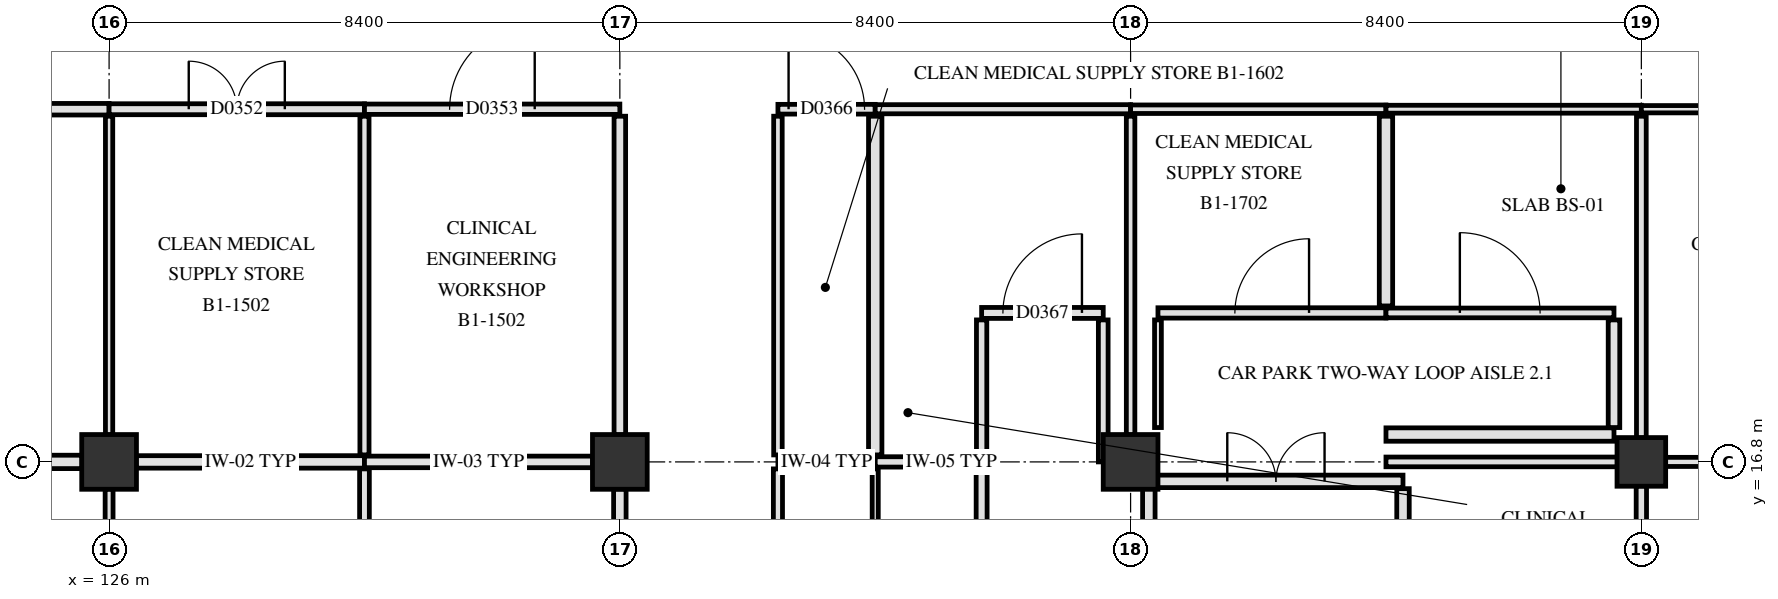
"""IFC4 building model, lengths in metres.
Left out: names, types, materials, properties, quantities, classifications, styles, units other than length and angle.
Written with IfcOpenShell. Run it as: python <this file> out.ifc"""

import sys

from ifc_helpers import new_model, si_unit, direction, frame, frame_2d, origin, origin_2d, place, context, subcontext, project, spatial, rectangle, extrude, element, fill, save


model = new_model("IFC4")
c1 = context("Model", 3, precision=1e-05, world=origin(), true_north=direction((0.0, 1.0)))
c2 = subcontext(c1, "Body", "Model", "MODEL_VIEW")
j1 = project(units=[si_unit("LENGTHUNIT", "METRE"), si_unit("PLANEANGLEUNIT", "RADIAN")], contexts=[c1])
p1 = place(None, origin())
s1 = spatial("IfcSite", under=j1, at=p1, CompositionType="ELEMENT")
p2 = place(p1, origin())
s2 = spatial("IfcBuilding", under=s1, at=p2, CompositionType="ELEMENT")
p3 = place(p2, frame((0.0, 0.0, -5.4)))
s3 = spatial("IfcBuildingStorey", under=s2, at=p3, CompositionType="ELEMENT", Elevation=-5.4)
for number, where, z_axis, x_axis in (
    (1, (126.0, 16.8, 0.0), (0.0, 0.0, 1.0), (1.0, 0.0, 0.0)),
    (2, (134.4, 16.8, 0.0), (0.0, 0.0, 1.0), (1.0, 0.0, 0.0)),
    (3, (142.8, 16.8, 0.0), (0.0, 0.0, 1.0), (1.0, 0.0, 0.0)),
):
    element("IfcColumn", number, at=place(p3, frame(where, z_axis=z_axis, x_axis=x_axis)), inside=s3, PredefinedType="COLUMN", context=c2, shape_type="SweptSolid", body=[
        extrude(rectangle(XDim=0.9, YDim=0.9, at=origin_2d()), origin(), (0.0, 0.0, 1.0), 5.4),
    ])
p4 = place(p3, frame((151.2, 16.8, 0.0), z_axis=(0.0, 0.0, 1.0), x_axis=(1.0, 0.0, 0.0)))
e4 = element("IfcColumn", 4, at=p4, inside=s3, PredefinedType="COLUMN", context=c2, shape_type="SweptSolid", body=[
    extrude(rectangle(XDim=0.8, YDim=0.8, at=origin_2d()), origin(), (0.0, 0.0, 1.0), 5.4),
])
p5 = place(p3, frame((147.28, 12.24, 0.0), z_axis=(0.0, 0.0, 1.0), x_axis=(0.0, 1.0, 0.0)))
e5 = element("IfcWall", 5, at=p5, inside=s3, PredefinedType="PARTITIONING", context=c2, shape_type="SweptSolid", body=[
    extrude(rectangle(XDim=4.12, YDim=0.205, at=frame_2d((2.06, 0.0))), origin(), (0.0, 0.0, 1.0), 5.07),
])
p6 = place(p3, frame((143.1, 12.24, 0.0), z_axis=(0.0, 0.0, 1.0), x_axis=(0.0, 1.0, 0.0)))
e6 = element("IfcWall", 6, at=p6, inside=s3, PredefinedType="PARTITIONING", context=c2, shape_type="SweptSolid", body=[
    extrude(rectangle(XDim=4.12, YDim=0.205, at=frame_2d((2.06, 0.0))), origin(), (0.0, 0.0, 1.0), 4.47),
])
p7 = place(p3, frame((143.1, 16.48, 0.0), z_axis=(0.0, 0.0, 1.0), x_axis=(1.0, 0.0, 0.0)))
e7 = element("IfcWall", 7, at=p7, inside=s3, PredefinedType="PARTITIONING", context=c2, shape_type="SweptSolid", body=[
    extrude(rectangle(XDim=4.18, YDim=0.205, at=frame_2d((2.09, 0.0))), origin(), (0.0, 0.0, 1.0), 4.42),
])
p8 = place(p7, frame((1.29, 0.0, 0.0)))
e8 = element("IfcOpeningElement", 8, at=p8, cuts=e7, PredefinedType="OPENING", context=c2, shape_type="SweptSolid", body=[
    extrude(rectangle(XDim=1.6, YDim=2.25, at=frame_2d((0.8, 1.125))), frame((0.0, 0.113, 0.0), z_axis=(0.0, -1.0, 0.0), x_axis=(1.0, 0.0, 0.0)), (0.0, 0.0, 1.0), 0.225),
])
p9 = place(p3, frame((121.8, 16.8, 0.0), z_axis=(0.0, 0.0, 1.0), x_axis=(1.0, 0.0, 0.0)))
e9 = element("IfcWall", 9, at=p9, inside=s3, PredefinedType="PARTITIONING", context=c2, shape_type="SweptSolid", body=[
    extrude(rectangle(XDim=3.755, YDim=0.22, at=frame_2d((1.877, 0.0))), origin(), (0.0, 0.0, 1.0), 4.42),
])
p10 = place(p3, frame((126.445, 16.8, 0.0), z_axis=(0.0, 0.0, 1.0), x_axis=(1.0, 0.0, 0.0)))
e10 = element("IfcWall", 10, at=p10, inside=s3, PredefinedType="PARTITIONING", context=c2, shape_type="SweptSolid", body=[
    extrude(rectangle(XDim=3.755, YDim=0.205, at=frame_2d((1.877, 0.0))), origin(), (0.0, 0.0, 1.0), 4.42),
])
p11 = place(p3, frame((130.2, 16.8, 0.0), z_axis=(0.0, 0.0, 1.0), x_axis=(1.0, 0.0, 0.0)))
e11 = element("IfcWall", 11, at=p11, inside=s3, PredefinedType="PARTITIONING", context=c2, shape_type="SweptSolid", body=[
    extrude(rectangle(XDim=3.755, YDim=0.19, at=frame_2d((1.877, 0.0))), origin(), (0.0, 0.0, 1.0), 4.42),
])
p12 = place(p3, frame((137.0, 16.8, 0.0), z_axis=(0.0, 0.0, 1.0), x_axis=(1.0, 0.0, 0.0)))
e12 = element("IfcWall", 12, at=p12, inside=s3, PredefinedType="PARTITIONING", context=c2, shape_type="SweptSolid", body=[
    extrude(rectangle(XDim=1.6, YDim=0.18, at=frame_2d((0.8, 0.0))), origin(), (0.0, 0.0, 1.0), 4.42),
])
p13 = place(p3, frame((138.6, 16.8, 0.0), z_axis=(0.0, 0.0, 1.0), x_axis=(1.0, 0.0, 0.0)))
e13 = element("IfcWall", 13, at=p13, inside=s3, PredefinedType="PARTITIONING", context=c2, shape_type="SweptSolid", body=[
    extrude(rectangle(XDim=1.75, YDim=0.17, at=frame_2d((0.875, 0.0))), origin(), (0.0, 0.0, 1.0), 4.42),
])
p14 = place(p3, frame((147.0, 16.8, 0.0), z_axis=(0.0, 0.0, 1.0), x_axis=(1.0, 0.0, 0.0)))
e14 = element("IfcWall", 14, at=p14, inside=s3, PredefinedType="PARTITIONING", context=c2, shape_type="SweptSolid", body=[
    extrude(rectangle(XDim=3.805, YDim=0.16, at=frame_2d((1.902, 0.0))), origin(), (0.0, 0.0, 1.0), 4.42),
])
p15 = place(p3, frame((151.595, 16.8, 0.0), z_axis=(0.0, 0.0, 1.0), x_axis=(1.0, 0.0, 0.0)))
e15 = element("IfcWall", 15, at=p15, inside=s3, PredefinedType="PARTITIONING", context=c2, shape_type="SweptSolid", body=[
    extrude(rectangle(XDim=3.805, YDim=0.15, at=frame_2d((1.902, 0.0))), origin(), (0.0, 0.0, 1.0), 4.42),
])
p16 = place(p3, frame((147.0, 17.25, 0.0), z_axis=(0.0, 0.0, 1.0), x_axis=(1.0, 0.0, 0.0)))
e16 = element("IfcWall", 16, at=p16, inside=s3, PredefinedType="PARTITIONING", context=c2, shape_type="SweptSolid", body=[
    extrude(rectangle(XDim=3.75, YDim=0.22, at=frame_2d((1.875, 0.0))), origin(), (0.0, 0.0, 1.0), 5.07),
])
p17 = place(p3, frame((140.35, 19.25, 0.0), z_axis=(0.0, 0.0, 1.0), x_axis=(1.0, 0.0, 0.0)))
e17 = element("IfcWall", 17, at=p17, inside=s3, PredefinedType="PARTITIONING", context=c2, shape_type="SweptSolid", body=[
    extrude(rectangle(XDim=2.0, YDim=0.18, at=frame_2d((1.0, 0.0))), origin(), (0.0, 0.0, 1.0), 5.07),
])
p18 = place(p17, frame((0.35, 0.0, 0.0)))
e18 = element("IfcOpeningElement", 18, at=p18, cuts=e17, PredefinedType="OPENING", context=c2, shape_type="SweptSolid", body=[
    extrude(rectangle(XDim=1.3, YDim=2.2, at=frame_2d((0.65, 1.1))), frame((0.0, 0.1, 0.0), z_axis=(0.0, -1.0, 0.0), x_axis=(1.0, 0.0, 0.0)), (0.0, 0.0, 1.0), 0.2),
])
p19 = place(p3, frame((143.25, 19.25, 0.0), z_axis=(0.0, 0.0, 1.0), x_axis=(1.0, 0.0, 0.0)))
e19 = element("IfcWall", 19, at=p19, inside=s3, PredefinedType="PARTITIONING", context=c2, shape_type="SweptSolid", body=[
    extrude(rectangle(XDim=3.75, YDim=0.17, at=frame_2d((1.875, 0.0))), origin(), (0.0, 0.0, 1.0), 5.07),
])
p20 = place(p19, frame((1.265, 0.0, 0.0)))
e20 = element("IfcOpeningElement", 20, at=p20, cuts=e19, PredefinedType="OPENING", context=c2, shape_type="SweptSolid", body=[
    extrude(rectangle(XDim=1.22, YDim=2.18, at=frame_2d((0.61, 1.09))), frame((0.0, 0.095, 0.0), z_axis=(0.0, -1.0, 0.0), x_axis=(1.0, 0.0, 0.0)), (0.0, 0.0, 1.0), 0.19),
])
p21 = place(p3, frame((147.0, 19.25, 0.0), z_axis=(0.0, 0.0, 1.0), x_axis=(1.0, 0.0, 0.0)))
e21 = element("IfcWall", 21, at=p21, inside=s3, PredefinedType="PARTITIONING", context=c2, shape_type="SweptSolid", body=[
    extrude(rectangle(XDim=3.75, YDim=0.16, at=frame_2d((1.875, 0.0))), origin(), (0.0, 0.0, 1.0), 5.07),
])
p22 = place(p21, frame((1.215, 0.0, 0.0)))
e22 = element("IfcOpeningElement", 22, at=p22, cuts=e21, PredefinedType="OPENING", context=c2, shape_type="SweptSolid", body=[
    extrude(rectangle(XDim=1.32, YDim=2.18, at=frame_2d((0.66, 1.09))), frame((0.0, 0.09, 0.0), z_axis=(0.0, -1.0, 0.0), x_axis=(1.0, 0.0, 0.0)), (0.0, 0.0, 1.0), 0.18),
])
p23 = place(p3, frame((121.8, 22.6, 0.0), z_axis=(0.0, 0.0, 1.0), x_axis=(1.0, 0.0, 0.0)))
e23 = element("IfcWall", 23, at=p23, inside=s3, PredefinedType="PARTITIONING", context=c2, shape_type="SweptSolid", body=[
    extrude(rectangle(XDim=4.2, YDim=0.19, at=frame_2d((2.1, 0.0))), origin(), (0.0, 0.0, 1.0), 4.47),
])
p24 = place(p23, frame((1.475, 0.0, 0.0)))
e24 = element("IfcOpeningElement", 24, at=p24, cuts=e23, PredefinedType="OPENING", context=c2, shape_type="SweptSolid", body=[
    extrude(rectangle(XDim=1.25, YDim=2.2, at=frame_2d((0.625, 1.1))), frame((0.0, 0.105, 0.0), z_axis=(0.0, -1.0, 0.0), x_axis=(1.0, 0.0, 0.0)), (0.0, 0.0, 1.0), 0.21),
])
p25 = place(p3, frame((126.0, 22.6, 0.0), z_axis=(0.0, 0.0, 1.0), x_axis=(1.0, 0.0, 0.0)))
e25 = element("IfcWall", 25, at=p25, inside=s3, PredefinedType="PARTITIONING", context=c2, shape_type="SweptSolid", body=[
    extrude(rectangle(XDim=4.2, YDim=0.18, at=frame_2d((2.1, 0.0))), origin(), (0.0, 0.0, 1.0), 4.47),
])
p26 = place(p25, frame((1.31, 0.0, 0.0)))
e26 = element("IfcOpeningElement", 26, at=p26, cuts=e25, PredefinedType="OPENING", context=c2, shape_type="SweptSolid", body=[
    extrude(rectangle(XDim=1.58, YDim=2.22, at=frame_2d((0.79, 1.11))), frame((0.0, 0.1, 0.0), z_axis=(0.0, -1.0, 0.0), x_axis=(1.0, 0.0, 0.0)), (0.0, 0.0, 1.0), 0.2),
])
p27 = place(p3, frame((130.2, 22.6, 0.0), z_axis=(0.0, 0.0, 1.0), x_axis=(1.0, 0.0, 0.0)))
e27 = element("IfcWall", 27, at=p27, inside=s3, PredefinedType="PARTITIONING", context=c2, shape_type="SweptSolid", body=[
    extrude(rectangle(XDim=4.2, YDim=0.17, at=frame_2d((2.1, 0.0))), origin(), (0.0, 0.0, 1.0), 4.47),
])
p28 = place(p27, frame((1.4, 0.0, 0.0)))
e28 = element("IfcOpeningElement", 28, at=p28, cuts=e27, PredefinedType="OPENING", context=c2, shape_type="SweptSolid", body=[
    extrude(rectangle(XDim=1.4, YDim=2.2, at=frame_2d((0.7, 1.1))), frame((0.0, 0.095, 0.0), z_axis=(0.0, -1.0, 0.0), x_axis=(1.0, 0.0, 0.0)), (0.0, 0.0, 1.0), 0.19),
])
p29 = place(p3, frame((137.0, 22.6, 0.0), z_axis=(0.0, 0.0, 1.0), x_axis=(1.0, 0.0, 0.0)))
e29 = element("IfcWall", 29, at=p29, inside=s3, PredefinedType="PARTITIONING", context=c2, shape_type="SweptSolid", body=[
    extrude(rectangle(XDim=1.6, YDim=0.16, at=frame_2d((0.8, 0.0))), origin(), (0.0, 0.0, 1.0), 5.07),
])
p30 = place(p29, frame((0.175, 0.0, 0.0)))
e30 = element("IfcOpeningElement", 30, at=p30, cuts=e29, PredefinedType="OPENING", context=c2, shape_type="SweptSolid", body=[
    extrude(rectangle(XDim=1.25, YDim=2.2, at=frame_2d((0.625, 1.1))), frame((0.0, 0.09, 0.0), z_axis=(0.0, -1.0, 0.0), x_axis=(1.0, 0.0, 0.0)), (0.0, 0.0, 1.0), 0.18),
])
p31 = place(p3, frame((138.6, 22.6, 0.0), z_axis=(0.0, 0.0, 1.0), x_axis=(1.0, 0.0, 0.0)))
e31 = element("IfcWall", 31, at=p31, inside=s3, PredefinedType="PARTITIONING", context=c2, shape_type="SweptSolid", body=[
    extrude(rectangle(XDim=4.2, YDim=0.15, at=frame_2d((2.1, 0.0))), origin(), (0.0, 0.0, 1.0), 4.47),
])
p32 = place(p3, frame((142.8, 22.6, 0.0), z_axis=(0.0, 0.0, 1.0), x_axis=(1.0, 0.0, 0.0)))
e32 = element("IfcWall", 32, at=p32, inside=s3, PredefinedType="PARTITIONING", context=c2, shape_type="SweptSolid", body=[
    extrude(rectangle(XDim=4.2, YDim=0.14, at=frame_2d((2.1, 0.0))), origin(), (0.0, 0.0, 1.0), 4.47),
])
p33 = place(p3, frame((147.0, 22.6, 0.0), z_axis=(0.0, 0.0, 1.0), x_axis=(1.0, 0.0, 0.0)))
e33 = element("IfcWall", 33, at=p33, inside=s3, PredefinedType="PARTITIONING", context=c2, shape_type="SweptSolid", body=[
    extrude(rectangle(XDim=4.2, YDim=0.13, at=frame_2d((2.1, 0.0))), origin(), (0.0, 0.0, 1.0), 4.47),
])
p34 = place(p3, frame((151.2, 22.6, 0.0), z_axis=(0.0, 0.0, 1.0), x_axis=(1.0, 0.0, 0.0)))
e34 = element("IfcWall", 34, at=p34, inside=s3, PredefinedType="PARTITIONING", context=c2, shape_type="SweptSolid", body=[
    extrude(rectangle(XDim=4.2, YDim=0.12, at=frame_2d((2.1, 0.0))), origin(), (0.0, 0.0, 1.0), 4.47),
])
p35 = place(p34, frame((1.31, 0.0, 0.0)))
e35 = element("IfcOpeningElement", 35, at=p35, cuts=e34, PredefinedType="OPENING", context=c2, shape_type="SweptSolid", body=[
    extrude(rectangle(XDim=1.58, YDim=2.22, at=frame_2d((0.79, 1.11))), frame((0.0, 0.07, 0.0), z_axis=(0.0, -1.0, 0.0), x_axis=(1.0, 0.0, 0.0)), (0.0, 0.0, 1.0), 0.14),
])
p36 = place(p3, frame((126.0, 11.115, 0.0), z_axis=(0.0, 0.0, 1.0), x_axis=(0.0, 1.0, 0.0)))
e36 = element("IfcWall", 36, at=p36, inside=s3, PredefinedType="PARTITIONING", context=c2, shape_type="SweptSolid", body=[
    extrude(rectangle(XDim=5.24, YDim=0.13, at=frame_2d((2.62, 0.0))), origin(), (0.0, 0.0, 1.0), 4.47),
])
p37 = place(p3, frame((126.0, 17.245, 0.0), z_axis=(0.0, 0.0, 1.0), x_axis=(0.0, 1.0, 0.0)))
e37 = element("IfcWall", 37, at=p37, inside=s3, PredefinedType="PARTITIONING", context=c2, shape_type="SweptSolid", body=[
    extrude(rectangle(XDim=5.24, YDim=0.12, at=frame_2d((2.62, 0.0))), origin(), (0.0, 0.0, 1.0), 4.47),
])
p38 = place(p3, frame((130.2, 11.115, 0.0), z_axis=(0.0, 0.0, 1.0), x_axis=(0.0, 1.0, 0.0)))
e38 = element("IfcWall", 38, at=p38, inside=s3, PredefinedType="PARTITIONING", context=c2, shape_type="SweptSolid", body=[
    extrude(rectangle(XDim=5.57, YDim=0.16, at=frame_2d((2.785, 0.0))), origin(), (0.0, 0.0, 1.0), 4.42),
])
p39 = place(p3, frame((130.2, 16.915, 0.0), z_axis=(0.0, 0.0, 1.0), x_axis=(0.0, 1.0, 0.0)))
e39 = element("IfcWall", 39, at=p39, inside=s3, PredefinedType="PARTITIONING", context=c2, shape_type="SweptSolid", body=[
    extrude(rectangle(XDim=5.57, YDim=0.15, at=frame_2d((2.785, 0.0))), origin(), (0.0, 0.0, 1.0), 4.42),
])
p40 = place(p3, frame((134.4, 11.115, 0.0), z_axis=(0.0, 0.0, 1.0), x_axis=(0.0, 1.0, 0.0)))
e40 = element("IfcWall", 40, at=p40, inside=s3, PredefinedType="PARTITIONING", context=c2, shape_type="SweptSolid", body=[
    extrude(rectangle(XDim=5.24, YDim=0.205, at=frame_2d((2.62, 0.0))), origin(), (0.0, 0.0, 1.0), 4.47),
])
p41 = place(p3, frame((134.4, 17.245, 0.0), z_axis=(0.0, 0.0, 1.0), x_axis=(0.0, 1.0, 0.0)))
e41 = element("IfcWall", 41, at=p41, inside=s3, PredefinedType="PARTITIONING", context=c2, shape_type="SweptSolid", body=[
    extrude(rectangle(XDim=5.24, YDim=0.19, at=frame_2d((2.62, 0.0))), origin(), (0.0, 0.0, 1.0), 4.47),
])
p42 = place(p3, frame((137.0, 11.115, 0.0), z_axis=(0.0, 0.0, 1.0), x_axis=(0.0, 1.0, 0.0)))
e42 = element("IfcWall", 42, at=p42, inside=s3, PredefinedType="PARTITIONING", context=c2, shape_type="SweptSolid", body=[
    extrude(rectangle(XDim=5.57, YDim=0.15, at=frame_2d((2.785, 0.0))), origin(), (0.0, 0.0, 1.0), 4.42),
])
p43 = place(p3, frame((137.0, 16.915, 0.0), z_axis=(0.0, 0.0, 1.0), x_axis=(0.0, 1.0, 0.0)))
e43 = element("IfcWall", 43, at=p43, inside=s3, PredefinedType="PARTITIONING", context=c2, shape_type="SweptSolid", body=[
    extrude(rectangle(XDim=5.57, YDim=0.14, at=frame_2d((2.785, 0.0))), origin(), (0.0, 0.0, 1.0), 4.42),
])
p44 = place(p3, frame((138.6, 11.115, 0.0), z_axis=(0.0, 0.0, 1.0), x_axis=(0.0, 1.0, 0.0)))
e44 = element("IfcWall", 44, at=p44, inside=s3, PredefinedType="PARTITIONING", context=c2, shape_type="SweptSolid", body=[
    extrude(rectangle(XDim=5.57, YDim=0.1, at=frame_2d((2.785, 0.0))), origin(), (0.0, 0.0, 1.0), 4.42),
])
p45 = place(p3, frame((138.6, 16.915, 0.0), z_axis=(0.0, 0.0, 1.0), x_axis=(0.0, 1.0, 0.0)))
e45 = element("IfcWall", 45, at=p45, inside=s3, PredefinedType="PARTITIONING", context=c2, shape_type="SweptSolid", body=[
    extrude(rectangle(XDim=5.57, YDim=0.22, at=frame_2d((2.785, 0.0))), origin(), (0.0, 0.0, 1.0), 4.42),
])
p46 = place(p3, frame((140.35, 11.115, 0.0), z_axis=(0.0, 0.0, 1.0), x_axis=(0.0, 1.0, 0.0)))
e46 = element("IfcWall", 46, at=p46, inside=s3, PredefinedType="PARTITIONING", context=c2, shape_type="SweptSolid", body=[
    extrude(rectangle(XDim=5.57, YDim=0.18, at=frame_2d((2.785, 0.0))), origin(), (0.0, 0.0, 1.0), 4.42),
])
p47 = place(p3, frame((140.35, 16.915, 0.0), z_axis=(0.0, 0.0, 1.0), x_axis=(0.0, 1.0, 0.0)))
e47 = element("IfcWall", 47, at=p47, inside=s3, PredefinedType="PARTITIONING", context=c2, shape_type="SweptSolid", body=[
    extrude(rectangle(XDim=2.22, YDim=0.17, at=frame_2d((1.11, 0.0))), origin(), (0.0, 0.0, 1.0), 4.42),
])
p48 = place(p3, frame((142.35, 16.8, 0.0), z_axis=(0.0, 0.0, 1.0), x_axis=(0.0, 1.0, 0.0)))
e48 = element("IfcWall", 48, at=p48, inside=s3, PredefinedType="PARTITIONING", context=c2, shape_type="SweptSolid", body=[
    extrude(rectangle(XDim=2.335, YDim=0.16, at=frame_2d((1.167, 0.0))), origin(), (0.0, 0.0, 1.0), 4.42),
])
p49 = place(p3, frame((142.8, 17.245, 0.0), z_axis=(0.0, 0.0, 1.0), x_axis=(0.0, 1.0, 0.0)))
e49 = element("IfcWall", 49, at=p49, inside=s3, PredefinedType="PARTITIONING", context=c2, shape_type="SweptSolid", body=[
    extrude(rectangle(XDim=5.24, YDim=0.14, at=frame_2d((2.62, 0.0))), origin(), (0.0, 0.0, 1.0), 4.47),
])
p50 = place(p3, frame((143.25, 17.365, 0.0), z_axis=(0.0, 0.0, 1.0), x_axis=(0.0, 1.0, 0.0)))
e50 = element("IfcWall", 50, at=p50, inside=s3, PredefinedType="PARTITIONING", context=c2, shape_type="SweptSolid", body=[
    extrude(rectangle(XDim=1.77, YDim=0.112, at=frame_2d((0.885, 0.0))), origin(), (0.0, 0.0, 1.0), 5.07),
])
p51 = place(p3, frame((147.0, 19.365, 0.0), z_axis=(0.0, 0.0, 1.0), x_axis=(0.0, 1.0, 0.0)))
e51 = element("IfcWall", 51, at=p51, inside=s3, PredefinedType="PARTITIONING", context=c2, shape_type="SweptSolid", body=[
    extrude(rectangle(XDim=3.12, YDim=0.22, at=frame_2d((1.56, 0.0))), origin(), (0.0, 0.0, 1.0), 5.07),
])
p52 = place(p3, frame((150.75, 17.365, 0.0), z_axis=(0.0, 0.0, 1.0), x_axis=(0.0, 1.0, 0.0)))
e52 = element("IfcWall", 52, at=p52, inside=s3, PredefinedType="PARTITIONING", context=c2, shape_type="SweptSolid", body=[
    extrude(rectangle(XDim=1.77, YDim=0.19, at=frame_2d((0.885, 0.0))), origin(), (0.0, 0.0, 1.0), 5.07),
])
p53 = place(p3, frame((151.2, 12.1, 0.0), z_axis=(0.0, 0.0, 1.0), x_axis=(0.0, 1.0, 0.0)))
e53 = element("IfcWall", 53, at=p53, inside=s3, PredefinedType="PARTITIONING", context=c2, shape_type="SweptSolid", body=[
    extrude(rectangle(XDim=4.305, YDim=0.17, at=frame_2d((2.152, 0.0))), origin(), (0.0, 0.0, 1.0), 4.47),
])
p54 = place(p3, frame((151.2, 17.195, 0.0), z_axis=(0.0, 0.0, 1.0), x_axis=(0.0, 1.0, 0.0)))
e54 = element("IfcWall", 54, at=p54, inside=s3, PredefinedType="PARTITIONING", context=c2, shape_type="SweptSolid", body=[
    extrude(rectangle(XDim=5.29, YDim=0.16, at=frame_2d((2.645, 0.0))), origin(), (0.0, 0.0, 1.0), 4.47),
])
p55 = place(p8, origin())
e55 = element("IfcDoor", 55, at=p55, inside=s3, OperationType="DOUBLE_SWING_LEFT", PredefinedType="DOOR", context=c2, shape_type="SweptSolid", body=[
    extrude(rectangle(XDim=1.6, YDim=2.25, at=frame_2d((0.8, 1.125))), frame((0.0, 0.025, 0.0), z_axis=(0.0, -1.0, 0.0), x_axis=(1.0, 0.0, 0.0)), (0.0, 0.0, 1.0), 0.05),
])
fill(e8, e55)
p56 = place(p26, origin())
e56 = element("IfcDoor", 56, at=p56, inside=s3, OperationType="DOUBLE_SWING_LEFT", PredefinedType="DOOR", context=c2, shape_type="SweptSolid", body=[
    extrude(rectangle(XDim=1.58, YDim=2.22, at=frame_2d((0.79, 1.11))), frame((0.0, 0.025, 0.0), z_axis=(0.0, -1.0, 0.0), x_axis=(1.0, 0.0, 0.0)), (0.0, 0.0, 1.0), 0.05),
])
fill(e26, e56)
p57 = place(p28, origin())
e57 = element("IfcDoor", 57, at=p57, inside=s3, OperationType="SINGLE_SWING_RIGHT", PredefinedType="DOOR", context=c2, shape_type="SweptSolid", body=[
    extrude(rectangle(XDim=1.4, YDim=2.2, at=frame_2d((0.7, 1.1))), frame((0.0, 0.025, 0.0), z_axis=(0.0, -1.0, 0.0), x_axis=(1.0, 0.0, 0.0)), (0.0, 0.0, 1.0), 0.05),
])
fill(e28, e57)
p58 = place(p30, origin())
e58 = element("IfcDoor", 58, at=p58, inside=s3, OperationType="SINGLE_SWING_LEFT", PredefinedType="DOOR", context=c2, shape_type="SweptSolid", body=[
    extrude(rectangle(XDim=1.25, YDim=2.2, at=frame_2d((0.625, 1.1))), frame((0.0, 0.025, 0.0), z_axis=(0.0, -1.0, 0.0), x_axis=(1.0, 0.0, 0.0)), (0.0, 0.0, 1.0), 0.05),
])
fill(e30, e58)
p59 = place(p18, origin())
e59 = element("IfcDoor", 59, at=p59, inside=s3, OperationType="SINGLE_SWING_RIGHT", PredefinedType="DOOR", context=c2, shape_type="SweptSolid", body=[
    extrude(rectangle(XDim=1.3, YDim=2.2, at=frame_2d((0.65, 1.1))), frame((0.0, 0.025, 0.0), z_axis=(0.0, -1.0, 0.0), x_axis=(1.0, 0.0, 0.0)), (0.0, 0.0, 1.0), 0.05),
])
fill(e18, e59)
p60 = place(p20, origin())
e60 = element("IfcDoor", 60, at=p60, inside=s3, OperationType="SINGLE_SWING_RIGHT", PredefinedType="DOOR", context=c2, shape_type="SweptSolid", body=[
    extrude(rectangle(XDim=1.22, YDim=2.18, at=frame_2d((0.61, 1.09))), frame((0.0, 0.025, 0.0), z_axis=(0.0, -1.0, 0.0), x_axis=(1.0, 0.0, 0.0)), (0.0, 0.0, 1.0), 0.05),
])
fill(e20, e60)
p61 = place(p22, origin())
e61 = element("IfcDoor", 61, at=p61, inside=s3, OperationType="SINGLE_SWING_LEFT", PredefinedType="DOOR", context=c2, shape_type="SweptSolid", body=[
    extrude(rectangle(XDim=1.32, YDim=2.18, at=frame_2d((0.66, 1.09))), frame((0.0, 0.025, 0.0), z_axis=(0.0, -1.0, 0.0), x_axis=(1.0, 0.0, 0.0)), (0.0, 0.0, 1.0), 0.05),
])
fill(e22, e61)
save(model, sys.argv[1])
